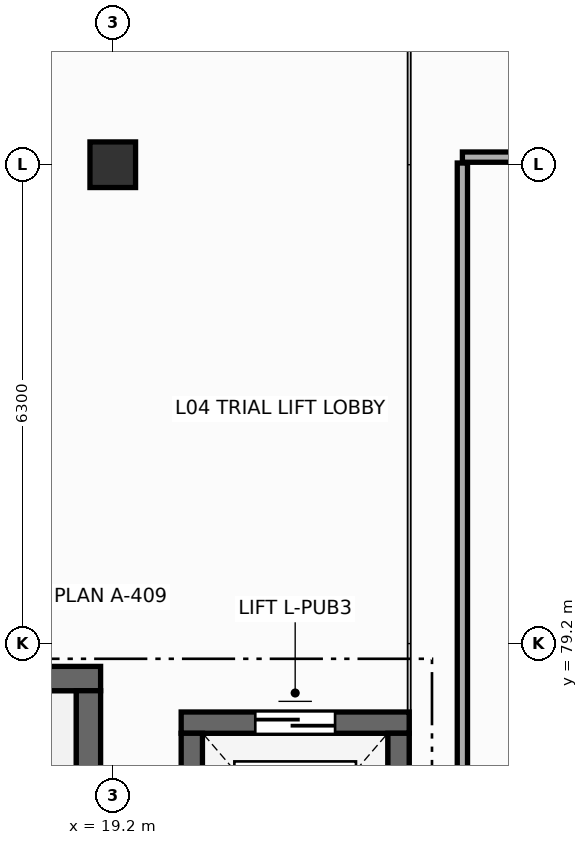
"""IFC4 building model, lengths in metres.
Left out: names, types, materials, properties, quantities, classifications, styles, units other than length and angle.
Written with IfcOpenShell. Run it as: python <this file> out.ifc"""

import sys

from ifc_helpers import new_model, si_unit, direction, frame, frame_2d, origin, origin_2d, place, context, subcontext, project, spatial, rectangle, extrude, element, fill, save


model = new_model("IFC4")
c1 = context("Model", 3, precision=1e-05, world=origin(), true_north=direction((0.0, 1.0)))
c2 = subcontext(c1, "Body", "Model", "MODEL_VIEW")
j1 = project(units=[si_unit("LENGTHUNIT", "METRE"), si_unit("PLANEANGLEUNIT", "RADIAN")], contexts=[c1])
p1 = place(None, origin())
s1 = spatial("IfcSite", under=j1, at=p1, CompositionType="ELEMENT")
p2 = place(p1, origin())
s2 = spatial("IfcBuilding", under=s1, at=p2, CompositionType="ELEMENT")
p3 = place(p2, frame((0.0, 0.0, 14.4)))
s3 = spatial("IfcBuildingStorey", under=s2, at=p3, CompositionType="ELEMENT", Elevation=14.4)
p4 = place(p3, frame((19.2, 85.5, 0.0), z_axis=(0.0, 0.0, 1.0), x_axis=(1.0, 0.0, 0.0)))
e1 = element("IfcColumn", 1, at=p4, inside=s3, PredefinedType="COLUMN", context=c2, shape_type="SweptSolid", body=[
    extrude(rectangle(XDim=0.6, YDim=0.6, at=origin_2d()), origin(), (0.0, 0.0, 1.0), 4.2),
])
p5 = place(p3, frame((9.86, 78.74, 0.0), z_axis=(0.0, 0.0, 1.0), x_axis=(1.0, 0.0, 0.0)))
e2 = element("IfcWall", 2, at=p5, inside=s3, PredefinedType="SHEAR", context=c2, shape_type="SweptSolid", body=[
    extrude(rectangle(XDim=9.18, YDim=0.32, at=frame_2d((4.59, 0.0))), origin(), (0.0, 0.0, 1.0), 3.96),
])
p6 = place(p3, frame((18.88, 78.58, 0.0), z_axis=(0.0, 0.0, 1.0), x_axis=(0.0, -1.0, 0.0)))
e3 = element("IfcWall", 3, at=p6, inside=s3, PredefinedType="SHEAR", context=c2, shape_type="SweptSolid", body=[
    extrude(rectangle(XDim=3.4, YDim=0.32, at=frame_2d((1.7, 0.0))), origin(), (0.0, 0.0, 1.0), 3.96),
])
p7 = place(p3, frame((20.1, 78.16, 0.0), z_axis=(0.0, 0.0, 1.0), x_axis=(1.0, 0.0, 0.0)))
e4 = element("IfcWall", 4, at=p7, inside=s3, PredefinedType="SHEAR", context=c2, shape_type="SweptSolid", body=[
    extrude(rectangle(XDim=3.0, YDim=0.28, at=frame_2d((1.5, 0.0))), origin(), (0.0, 0.0, 1.0), 3.96),
])
p8 = place(p7, frame((0.975, 0.0, 0.0)))
e5 = element("IfcOpeningElement", 5, at=p8, cuts=e4, PredefinedType="OPENING", context=c2, shape_type="SweptSolid", body=[
    extrude(rectangle(XDim=1.05, YDim=2.2, at=frame_2d((0.525, 1.1))), frame((0.0, 0.15, 0.0), z_axis=(0.0, -1.0, 0.0), x_axis=(1.0, 0.0, 0.0)), (0.0, 0.0, 1.0), 0.3),
])
for number, where, z_axis, x_axis in (
    (6, (20.24, 75.18, 0.0), (0.0, 0.0, 1.0), (0.0, 1.0, 0.0)),
    (7, (22.96, 78.02, 0.0), (0.0, 0.0, 1.0), (0.0, -1.0, 0.0)),
):
    element("IfcWall", number, at=place(p3, frame(where, z_axis=z_axis, x_axis=x_axis)), inside=s3, PredefinedType="SHEAR", context=c2, shape_type="SweptSolid", body=[
        extrude(rectangle(XDim=2.84, YDim=0.28, at=frame_2d((1.42, 0.0))), origin(), (0.0, 0.0, 1.0), 3.96),
    ])
p9 = place(p3, frame((23.8, 85.6, 0.0), z_axis=(0.0, 0.0, 1.0), x_axis=(1.0, 0.0, 0.0)))
e8 = element("IfcWall", 8, at=p9, inside=s3, PredefinedType="PARTITIONING", context=c2, shape_type="SweptSolid", body=[
    extrude(rectangle(XDim=21.8, YDim=0.135, at=frame_2d((10.9, 0.0))), origin(), (0.0, 0.0, 1.0), 3.09),
])
p10 = place(p9, frame((8.41, 0.0, 0.0)))
e9 = element("IfcOpeningElement", 9, at=p10, cuts=e8, PredefinedType="OPENING", context=c2, shape_type="SweptSolid", body=[
    extrude(rectangle(XDim=0.95, YDim=2.15, at=frame_2d((0.475, 1.075))), frame((0.0, 0.077, 0.0), z_axis=(0.0, -1.0, 0.0), x_axis=(1.0, 0.0, 0.0)), (0.0, 0.0, 1.0), 0.155),
])
p11 = place(p3, frame((23.8, 67.654, 0.0), z_axis=(0.0, 0.0, 1.0), x_axis=(0.0, 1.0, 0.0)))
e10 = element("IfcWall", 10, at=p11, inside=s3, PredefinedType="PARTITIONING", context=c2, shape_type="SweptSolid", body=[
    extrude(rectangle(XDim=17.868, YDim=0.135, at=frame_2d((8.934, 0.0))), origin(), (0.0, 0.0, 1.0), 3.29),
])
p12 = place(p8, origin())
e11 = element("IfcDoor", 11, at=p12, inside=s3, OperationType="DOUBLE_DOOR_SLIDING", PredefinedType="DOOR", context=c2, shape_type="SweptSolid", body=[
    extrude(rectangle(XDim=1.05, YDim=2.2, at=frame_2d((0.525, 1.1))), frame((0.0, 0.025, 0.0), z_axis=(0.0, -1.0, 0.0), x_axis=(1.0, 0.0, 0.0)), (0.0, 0.0, 1.0), 0.05),
])
fill(e5, e11)
save(model, sys.argv[1])
